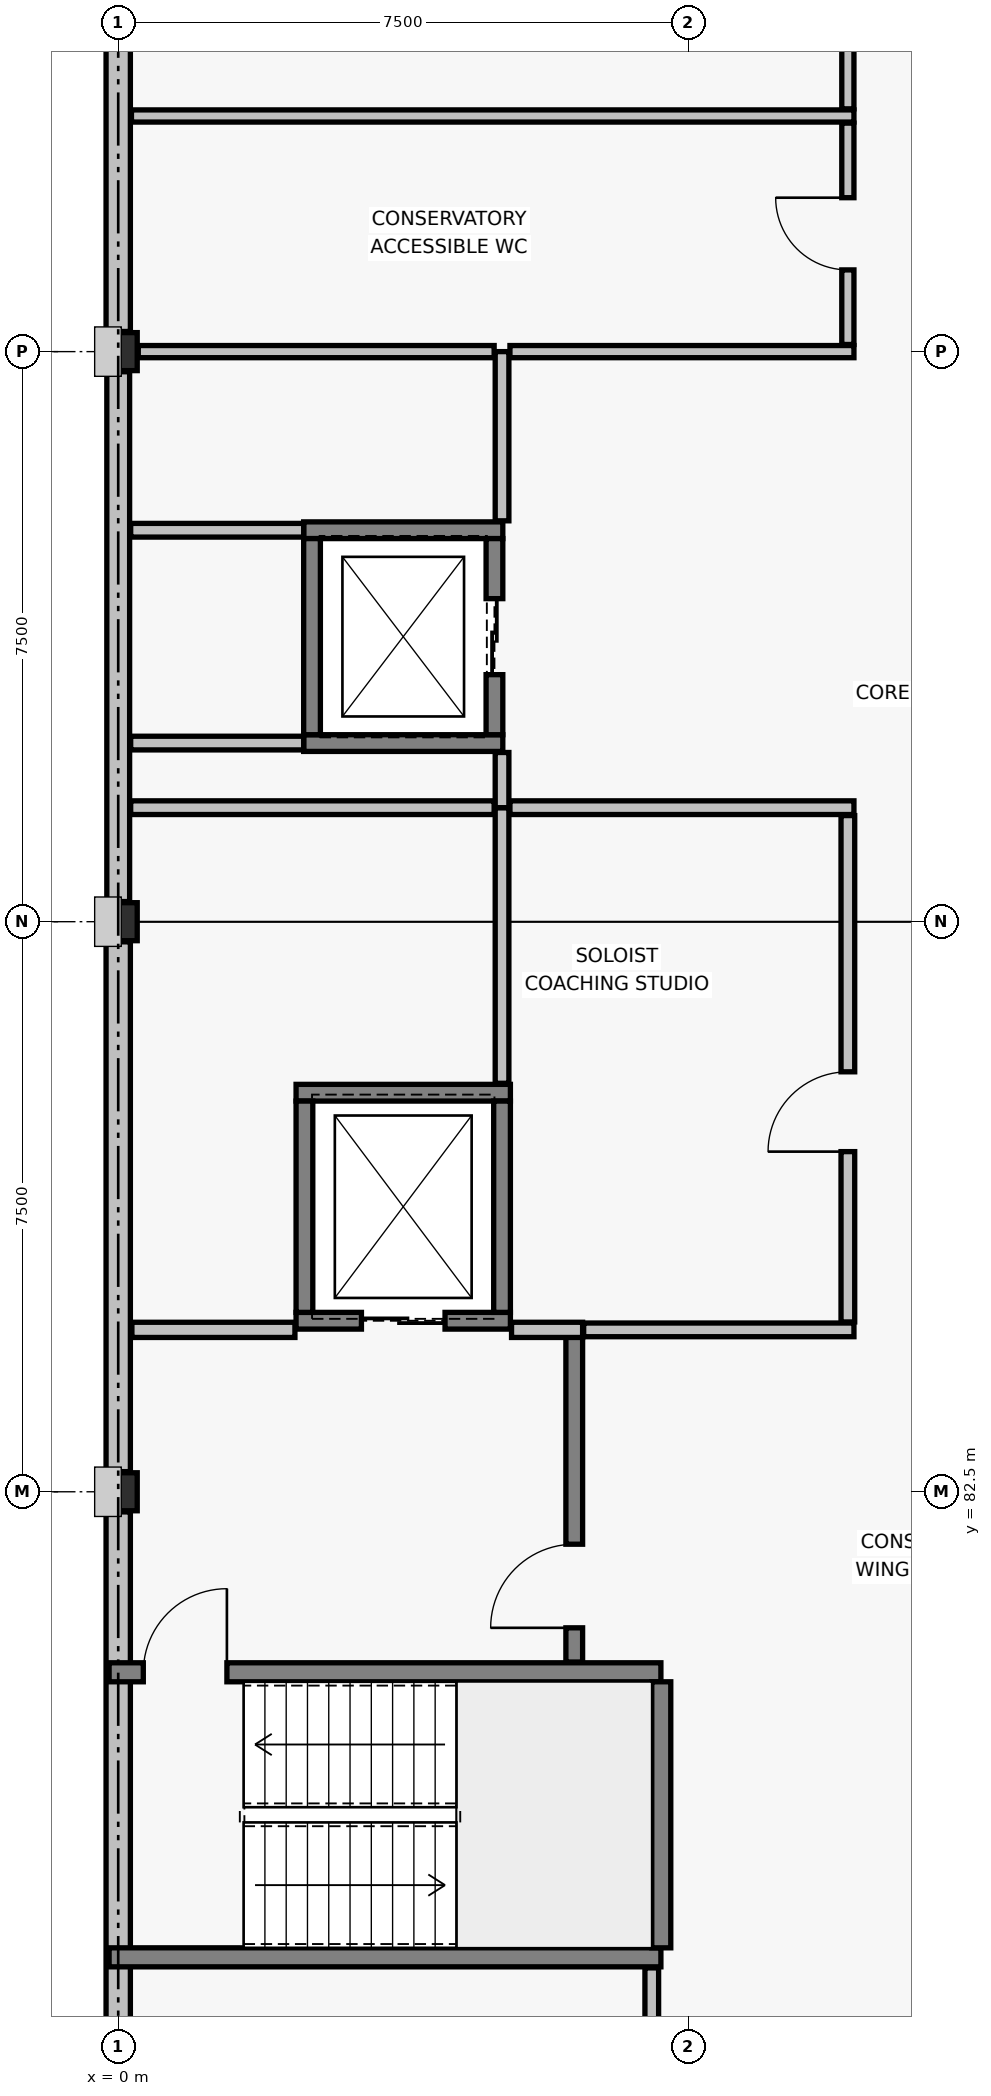
"""IFC4 building model, lengths in metres.
Left out: names, types, materials, properties, quantities, classifications, styles, units other than length and angle.
Written with IfcOpenShell. Run it as: python <this file> out.ifc"""

import sys

from ifc_helpers import new_model, si_unit, direction, frame, frame_2d, origin, origin_2d, place, context, subcontext, project, spatial, rectangle, extrude, element, fill, save


model = new_model("IFC4")
c1 = context("Model", 3, precision=1e-05, world=origin(), true_north=direction((0.0, 1.0)))
c2 = subcontext(c1, "Body", "Model", "MODEL_VIEW")
j1 = project(units=[si_unit("LENGTHUNIT", "METRE"), si_unit("PLANEANGLEUNIT", "RADIAN")], contexts=[c1])
p1 = place(None, origin())
s1 = spatial("IfcSite", under=j1, at=p1, CompositionType="ELEMENT")
p2 = place(p1, origin())
s2 = spatial("IfcBuilding", under=s1, at=p2, CompositionType="ELEMENT")
p3 = place(p2, frame((0.0, 0.0, 17.1)))
s3 = spatial("IfcBuildingStorey", under=s2, at=p3, CompositionType="ELEMENT", Elevation=17.1)
for number, where, z_axis, x_axis in (
    (1, (0.0, 82.5, 0.0), (0.0, 0.0, 1.0), (1.0, 0.0, 0.0)),
    (2, (0.0, 90.0, 0.0), (0.0, 0.0, 1.0), (1.0, 0.0, 0.0)),
    (3, (0.0, 97.5, 0.0), (0.0, 0.0, 1.0), (1.0, 0.0, 0.0)),
):
    element("IfcColumn", number, at=place(p3, frame(where, z_axis=z_axis, x_axis=x_axis)), inside=s3, PredefinedType="COLUMN", context=c2, shape_type="SweptSolid", body=[
        extrude(rectangle(XDim=0.5, YDim=0.5, at=origin_2d()), origin(), (0.0, 0.0, 1.0), 3.9),
    ])
for number, where, z_axis, x_axis in (
    (4, (0.0, 75.265, 0.0), (0.0, 0.0, 1.0), (0.0, 1.0, 0.0)),
    (5, (0.0, 82.765, 0.0), (0.0, 0.0, 1.0), (0.0, 1.0, 0.0)),
):
    element("IfcWall", number, at=place(p3, frame(where, z_axis=z_axis, x_axis=x_axis)), inside=s3, PredefinedType="SOLIDWALL", context=c2, shape_type="SweptSolid", body=[
        extrude(rectangle(XDim=6.97, YDim=0.32, at=frame_2d((3.485, 0.0))), origin(), (0.0, 0.0, 1.0), 2.59),
    ])
p4 = place(p3, frame((0.0, 90.265, 0.0), z_axis=(0.0, 0.0, 1.0), x_axis=(0.0, 1.0, 0.0)))
e6 = element("IfcWall", 6, at=p4, inside=s3, PredefinedType="SOLIDWALL", context=c2, shape_type="SweptSolid", body=[
    extrude(rectangle(XDim=6.97, YDim=0.3, at=frame_2d((3.485, 0.0))), origin(), (0.0, 0.0, 1.0), 2.59),
])
p5 = place(p3, frame((0.0, 97.765, 0.0), z_axis=(0.0, 0.0, 1.0), x_axis=(0.0, 1.0, 0.0)))
e7 = element("IfcWall", 7, at=p5, inside=s3, PredefinedType="SOLIDWALL", context=c2, shape_type="SweptSolid", body=[
    extrude(rectangle(XDim=6.97, YDim=0.32, at=frame_2d((3.485, 0.0))), origin(), (0.0, 0.0, 1.0), 2.59),
])
p6 = place(p3, frame((-0.12, 76.375, 0.0), z_axis=(0.0, 0.0, 1.0), x_axis=(1.0, 0.0, 0.0)))
e8 = element("IfcWall", 8, at=p6, inside=s3, PredefinedType="SOLIDWALL", context=c2, shape_type="SweptSolid", body=[
    extrude(rectangle(XDim=7.26, YDim=0.25, at=frame_2d((3.63, 0.0))), origin(), (0.0, 0.0, 1.0), 3.62),
])
p7 = place(p3, frame((-0.12, 80.125, 0.0), z_axis=(0.0, 0.0, 1.0), x_axis=(1.0, 0.0, 0.0)))
e9 = element("IfcWall", 9, at=p7, inside=s3, PredefinedType="SOLIDWALL", context=c2, shape_type="SweptSolid", body=[
    extrude(rectangle(XDim=7.26, YDim=0.25, at=frame_2d((3.63, 0.0))), origin(), (0.0, 0.0, 1.0), 3.62),
])
p8 = place(p7, frame((0.45, 0.0, 0.0)))
e10 = element("IfcOpeningElement", 10, at=p8, cuts=e9, PredefinedType="OPENING", context=c2, shape_type="SweptSolid", body=[
    extrude(rectangle(XDim=1.1, YDim=2.15, at=frame_2d((0.55, 1.075))), frame((0.0, 0.135, 0.0), z_axis=(0.0, -1.0, 0.0), x_axis=(1.0, 0.0, 0.0)), (0.0, 0.0, 1.0), 0.27),
])
p9 = place(p3, frame((7.145, 76.5, 0.0), z_axis=(0.0, 0.0, 1.0), x_axis=(0.0, 1.0, 0.0)))
e11 = element("IfcWall", 11, at=p9, inside=s3, PredefinedType="SOLIDWALL", context=c2, shape_type="SweptSolid", body=[
    extrude(rectangle(XDim=3.5, YDim=0.25, at=frame_2d((1.75, 0.0))), origin(), (0.0, 0.0, 1.0), 3.62),
])
for number, where, z_axis, x_axis in (
    (12, (2.44, 92.35, 0.0), (0.0, 0.0, 1.0), (1.0, 0.0, 0.0)),
    (13, (2.44, 95.15, 0.0), (0.0, 0.0, 1.0), (1.0, 0.0, 0.0)),
):
    element("IfcWall", number, at=place(p3, frame(where, z_axis=z_axis, x_axis=x_axis)), inside=s3, PredefinedType="SOLIDWALL", context=c2, shape_type="SweptSolid", body=[
        extrude(rectangle(XDim=2.62, YDim=0.22, at=frame_2d((1.31, 0.0))), origin(), (0.0, 0.0, 1.0), 3.62),
    ])
p10 = place(p3, frame((2.55, 92.46, 0.0), z_axis=(0.0, 0.0, 1.0), x_axis=(0.0, 1.0, 0.0)))
e14 = element("IfcWall", 14, at=p10, inside=s3, PredefinedType="SOLIDWALL", context=c2, shape_type="SweptSolid", body=[
    extrude(rectangle(XDim=2.58, YDim=0.22, at=frame_2d((1.29, 0.0))), origin(), (0.0, 0.0, 1.0), 3.62),
])
p11 = place(p3, frame((4.95, 92.46, 0.0), z_axis=(0.0, 0.0, 1.0), x_axis=(0.0, 1.0, 0.0)))
e15 = element("IfcWall", 15, at=p11, inside=s3, PredefinedType="SOLIDWALL", context=c2, shape_type="SweptSolid", body=[
    extrude(rectangle(XDim=2.58, YDim=0.22, at=frame_2d((1.29, 0.0))), origin(), (0.0, 0.0, 1.0), 3.62),
])
p12 = place(p11, frame((0.79, 0.0, 0.0)))
e16 = element("IfcOpeningElement", 16, at=p12, cuts=e15, PredefinedType="OPENING", context=c2, shape_type="SweptSolid", body=[
    extrude(rectangle(XDim=1.0, YDim=2.15, at=frame_2d((0.5, 1.075))), frame((0.0, 0.12, 0.0), z_axis=(0.0, -1.0, 0.0), x_axis=(1.0, 0.0, 0.0)), (0.0, 0.0, 1.0), 0.24),
])
p13 = place(p3, frame((2.34, 84.75, 0.0), z_axis=(0.0, 0.0, 1.0), x_axis=(1.0, 0.0, 0.0)))
e17 = element("IfcWall", 17, at=p13, inside=s3, PredefinedType="SOLIDWALL", context=c2, shape_type="SweptSolid", body=[
    extrude(rectangle(XDim=2.82, YDim=0.22, at=frame_2d((1.41, 0.0))), origin(), (0.0, 0.0, 1.0), 3.62),
])
p14 = place(p13, frame((0.86, 0.0, 0.0)))
e18 = element("IfcOpeningElement", 18, at=p14, cuts=e17, PredefinedType="OPENING", context=c2, shape_type="SweptSolid", body=[
    extrude(rectangle(XDim=1.1, YDim=2.15, at=frame_2d((0.55, 1.075))), frame((0.0, 0.12, 0.0), z_axis=(0.0, -1.0, 0.0), x_axis=(1.0, 0.0, 0.0)), (0.0, 0.0, 1.0), 0.24),
])
p15 = place(p3, frame((2.34, 87.75, 0.0), z_axis=(0.0, 0.0, 1.0), x_axis=(1.0, 0.0, 0.0)))
e19 = element("IfcWall", 19, at=p15, inside=s3, PredefinedType="SOLIDWALL", context=c2, shape_type="SweptSolid", body=[
    extrude(rectangle(XDim=2.82, YDim=0.22, at=frame_2d((1.41, 0.0))), origin(), (0.0, 0.0, 1.0), 3.62),
])
for number, where, z_axis, x_axis in (
    (20, (2.45, 84.86, 0.0), (0.0, 0.0, 1.0), (0.0, 1.0, 0.0)),
    (21, (5.05, 84.86, 0.0), (0.0, 0.0, 1.0), (0.0, 1.0, 0.0)),
):
    element("IfcWall", number, at=place(p3, frame(where, z_axis=z_axis, x_axis=x_axis)), inside=s3, PredefinedType="SOLIDWALL", context=c2, shape_type="SweptSolid", body=[
        extrude(rectangle(XDim=2.78, YDim=0.22, at=frame_2d((1.39, 0.0))), origin(), (0.0, 0.0, 1.0), 3.62),
    ])
p16 = place(p3, frame((6.0, 80.26, 0.0), z_axis=(0.0, 0.0, 1.0), x_axis=(0.0, 1.0, 0.0)))
e22 = element("IfcWall", 22, at=p16, inside=s3, PredefinedType="SOLIDWALL", context=c2, shape_type="SweptSolid", body=[
    extrude(rectangle(XDim=4.37, YDim=0.22, at=frame_2d((2.185, 0.0))), origin(), (0.0, 0.0, 1.0), 3.62),
])
p17 = place(p16, frame((0.45, 0.0, 0.0)))
e23 = element("IfcOpeningElement", 23, at=p17, cuts=e22, PredefinedType="OPENING", context=c2, shape_type="SweptSolid", body=[
    extrude(rectangle(XDim=1.1, YDim=2.15, at=frame_2d((0.55, 1.075))), frame((0.0, 0.12, 0.0), z_axis=(0.0, -1.0, 0.0), x_axis=(1.0, 0.0, 0.0)), (0.0, 0.0, 1.0), 0.24),
])
p18 = place(p3, frame((0.18, 84.63, 0.0), z_axis=(0.0, 0.0, 1.0), x_axis=(1.0, 0.0, 0.0)))
e24 = element("IfcWall", 24, at=p18, inside=s3, PredefinedType="PARTITIONING", context=c2, shape_type="SweptSolid", body=[
    extrude(rectangle(XDim=2.145, YDim=0.2, at=frame_2d((1.073, 0.0))), origin(), (0.0, 0.0, 1.0), 2.85),
])
p19 = place(p3, frame((5.175, 84.63, 0.0), z_axis=(0.0, 0.0, 1.0), x_axis=(1.0, 0.0, 0.0)))
e25 = element("IfcWall", 25, at=p19, inside=s3, PredefinedType="PARTITIONING", context=c2, shape_type="SweptSolid", body=[
    extrude(rectangle(XDim=0.935, YDim=0.2, at=frame_2d((0.468, 0.0))), origin(), (0.0, 0.0, 1.0), 3.2),
])
p20 = place(p3, frame((7.02, 75.0, 0.0), z_axis=(0.0, 0.0, 1.0), x_axis=(0.0, 1.0, 0.0)))
e26 = element("IfcWall", 26, at=p20, inside=s3, PredefinedType="PARTITIONING", context=c2, shape_type="SweptSolid", body=[
    extrude(rectangle(XDim=1.236, YDim=0.18, at=frame_2d((0.618, 0.0))), origin(), (0.0, 0.0, 1.0), 2.59),
])
p21 = place(p3, frame((5.05, 87.874, 0.0), z_axis=(0.0, 0.0, 1.0), x_axis=(0.0, 1.0, 0.0)))
e27 = element("IfcWall", 27, at=p21, inside=s3, PredefinedType="PARTITIONING", context=c2, shape_type="SweptSolid", body=[
    extrude(rectangle(XDim=3.626, YDim=0.18, at=frame_2d((1.813, 0.0))), origin(), (0.0, 0.0, 1.0), 2.59),
])
p22 = place(p3, frame((6.124, 84.63, 0.0), z_axis=(0.0, 0.0, 1.0), x_axis=(1.0, 0.0, 0.0)))
e28 = element("IfcWall", 28, at=p22, inside=s3, PredefinedType="PARTITIONING", context=c2, shape_type="SweptSolid", body=[
    extrude(rectangle(XDim=3.556, YDim=0.18, at=frame_2d((1.778, 0.0))), origin(), (0.0, 0.0, 1.0), 2.97),
])
p23 = place(p3, frame((0.164, 91.5, 0.0), z_axis=(0.0, 0.0, 1.0), x_axis=(1.0, 0.0, 0.0)))
e29 = element("IfcWall", 29, at=p23, inside=s3, PredefinedType="PARTITIONING", context=c2, shape_type="SweptSolid", body=[
    extrude(rectangle(XDim=4.782, YDim=0.18, at=frame_2d((2.391, 0.0))), origin(), (0.0, 0.0, 1.0), 2.84),
])
p24 = place(p3, frame((5.154, 91.5, 0.0), z_axis=(0.0, 0.0, 1.0), x_axis=(1.0, 0.0, 0.0)))
e30 = element("IfcWall", 30, at=p24, inside=s3, PredefinedType="PARTITIONING", context=c2, shape_type="SweptSolid", body=[
    extrude(rectangle(XDim=4.526, YDim=0.18, at=frame_2d((2.263, 0.0))), origin(), (0.0, 0.0, 1.0), 2.97),
])
p25 = place(p3, frame((9.6, 84.734, 0.0), z_axis=(0.0, 0.0, 1.0), x_axis=(0.0, 1.0, 0.0)))
e31 = element("IfcWall", 31, at=p25, inside=s3, PredefinedType="PARTITIONING", context=c2, shape_type="SweptSolid", body=[
    extrude(rectangle(XDim=6.662, YDim=0.18, at=frame_2d((3.331, 0.0))), origin(), (0.0, 0.0, 1.0), 2.59),
])
p26 = place(p25, frame((2.241, 0.0, 0.0)))
e32 = element("IfcOpeningElement", 32, at=p26, cuts=e31, PredefinedType="OPENING", context=c2, shape_type="SweptSolid", body=[
    extrude(rectangle(XDim=1.05, YDim=2.12, at=frame_2d((0.525, 1.06))), frame((0.0, 0.1, 0.0), z_axis=(0.0, -1.0, 0.0), x_axis=(1.0, 0.0, 0.0)), (0.0, 0.0, 1.0), 0.2),
])
for number, where, z_axis, x_axis in (
    (33, (0.164, 92.35, 0.0), (0.0, 0.0, 1.0), (1.0, 0.0, 0.0)),
    (34, (0.164, 95.15, 0.0), (0.0, 0.0, 1.0), (1.0, 0.0, 0.0)),
):
    element("IfcWall", number, at=place(p3, frame(where, z_axis=z_axis, x_axis=x_axis)), inside=s3, PredefinedType="PARTITIONING", context=c2, shape_type="SweptSolid", body=[
        extrude(rectangle(XDim=2.276, YDim=0.18, at=frame_2d((1.138, 0.0))), origin(), (0.0, 0.0, 1.0), 2.84),
    ])
p27 = place(p3, frame((5.05, 91.5, 0.0), z_axis=(0.0, 0.0, 1.0), x_axis=(0.0, 1.0, 0.0)))
e35 = element("IfcWall", 35, at=p27, inside=s3, PredefinedType="PARTITIONING", context=c2, shape_type="SweptSolid", body=[
    extrude(rectangle(XDim=0.726, YDim=0.18, at=frame_2d((0.363, 0.0))), origin(), (0.0, 0.0, 1.0), 2.97),
])
p28 = place(p3, frame((5.05, 95.274, 0.0), z_axis=(0.0, 0.0, 1.0), x_axis=(0.0, 1.0, 0.0)))
e36 = element("IfcWall", 36, at=p28, inside=s3, PredefinedType="PARTITIONING", context=c2, shape_type="SweptSolid", body=[
    extrude(rectangle(XDim=2.226, YDim=0.18, at=frame_2d((1.113, 0.0))), origin(), (0.0, 0.0, 1.0), 2.59),
])
p29 = place(p3, frame((0.264, 97.5, 0.0), z_axis=(0.0, 0.0, 1.0), x_axis=(1.0, 0.0, 0.0)))
e37 = element("IfcWall", 37, at=p29, inside=s3, PredefinedType="PARTITIONING", context=c2, shape_type="SweptSolid", body=[
    extrude(rectangle(XDim=4.682, YDim=0.16, at=frame_2d((2.341, 0.0))), origin(), (0.0, 0.0, 1.0), 2.59),
])
p30 = place(p3, frame((5.154, 97.5, 0.0), z_axis=(0.0, 0.0, 1.0), x_axis=(1.0, 0.0, 0.0)))
e38 = element("IfcWall", 38, at=p30, inside=s3, PredefinedType="PARTITIONING", context=c2, shape_type="SweptSolid", body=[
    extrude(rectangle(XDim=4.526, YDim=0.16, at=frame_2d((2.263, 0.0))), origin(), (0.0, 0.0, 1.0), 2.59),
])
p31 = place(p3, frame((0.174, 100.6, 0.0), z_axis=(0.0, 0.0, 1.0), x_axis=(1.0, 0.0, 0.0)))
e39 = element("IfcWall", 39, at=p31, inside=s3, PredefinedType="PARTITIONING", context=c2, shape_type="SweptSolid", body=[
    extrude(rectangle(XDim=9.506, YDim=0.16, at=frame_2d((4.753, 0.0))), origin(), (0.0, 0.0, 1.0), 2.97),
])
p32 = place(p3, frame((9.6, 97.594, 0.0), z_axis=(0.0, 0.0, 1.0), x_axis=(0.0, 1.0, 0.0)))
e40 = element("IfcWall", 40, at=p32, inside=s3, PredefinedType="PARTITIONING", context=c2, shape_type="SweptSolid", body=[
    extrude(rectangle(XDim=2.912, YDim=0.16, at=frame_2d((1.456, 0.0))), origin(), (0.0, 0.0, 1.0), 2.59),
])
p33 = place(p32, frame((0.981, 0.0, 0.0)))
e41 = element("IfcOpeningElement", 41, at=p33, cuts=e40, PredefinedType="OPENING", context=c2, shape_type="SweptSolid", body=[
    extrude(rectangle(XDim=0.95, YDim=2.1, at=frame_2d((0.475, 1.05))), frame((0.0, 0.09, 0.0), z_axis=(0.0, -1.0, 0.0), x_axis=(1.0, 0.0, 0.0)), (0.0, 0.0, 1.0), 0.18),
])
p34 = place(p3, frame((9.6, 100.694, 0.0), z_axis=(0.0, 0.0, 1.0), x_axis=(0.0, 1.0, 0.0)))
e42 = element("IfcWall", 42, at=p34, inside=s3, PredefinedType="PARTITIONING", context=c2, shape_type="SweptSolid", body=[
    extrude(rectangle(XDim=11.642, YDim=0.16, at=frame_2d((5.821, 0.0))), origin(), (0.0, 0.0, 1.0), 2.59),
])
p35 = place(p34, frame((5.281, 0.0, 0.0)))
e43 = element("IfcOpeningElement", 43, at=p35, cuts=e42, PredefinedType="OPENING", context=c2, shape_type="SweptSolid", body=[
    extrude(rectangle(XDim=1.05, YDim=2.12, at=frame_2d((0.525, 1.06))), frame((0.0, 0.09, 0.0), z_axis=(0.0, -1.0, 0.0), x_axis=(1.0, 0.0, 0.0)), (0.0, 0.0, 1.0), 0.18),
])
p36 = place(p8, origin())
e44 = element("IfcDoor", 44, at=p36, inside=s3, OperationType="SINGLE_SWING_RIGHT", PredefinedType="DOOR", context=c2, shape_type="SweptSolid", body=[
    extrude(rectangle(XDim=1.1, YDim=2.15, at=frame_2d((0.55, 1.075))), frame((0.0, 0.025, 0.0), z_axis=(0.0, -1.0, 0.0), x_axis=(1.0, 0.0, 0.0)), (0.0, 0.0, 1.0), 0.05),
])
fill(e10, e44)
p37 = place(p12, origin())
e45 = element("IfcDoor", 45, at=p37, inside=s3, OperationType="SLIDING_TO_LEFT", PredefinedType="DOOR", context=c2, shape_type="SweptSolid", body=[
    extrude(rectangle(XDim=1.0, YDim=2.15, at=frame_2d((0.5, 1.075))), frame((0.0, 0.025, 0.0), z_axis=(0.0, -1.0, 0.0), x_axis=(1.0, 0.0, 0.0)), (0.0, 0.0, 1.0), 0.05),
])
fill(e16, e45)
p38 = place(p14, origin())
e46 = element("IfcDoor", 46, at=p38, inside=s3, OperationType="SLIDING_TO_LEFT", PredefinedType="DOOR", context=c2, shape_type="SweptSolid", body=[
    extrude(rectangle(XDim=1.1, YDim=2.15, at=frame_2d((0.55, 1.075))), frame((0.0, 0.025, 0.0), z_axis=(0.0, -1.0, 0.0), x_axis=(1.0, 0.0, 0.0)), (0.0, 0.0, 1.0), 0.05),
])
fill(e18, e46)
p39 = place(p17, origin())
e47 = element("IfcDoor", 47, at=p39, inside=s3, OperationType="SINGLE_SWING_LEFT", PredefinedType="DOOR", context=c2, shape_type="SweptSolid", body=[
    extrude(rectangle(XDim=1.1, YDim=2.15, at=frame_2d((0.55, 1.075))), frame((0.0, 0.025, 0.0), z_axis=(0.0, -1.0, 0.0), x_axis=(1.0, 0.0, 0.0)), (0.0, 0.0, 1.0), 0.05),
])
fill(e23, e47)
p40 = place(p26, origin())
e48 = element("IfcDoor", 48, at=p40, inside=s3, OperationType="SINGLE_SWING_LEFT", PredefinedType="DOOR", context=c2, shape_type="SweptSolid", body=[
    extrude(rectangle(XDim=1.05, YDim=2.12, at=frame_2d((0.525, 1.06))), frame((0.0, 0.025, 0.0), z_axis=(0.0, -1.0, 0.0), x_axis=(1.0, 0.0, 0.0)), (0.0, 0.0, 1.0), 0.05),
])
fill(e32, e48)
p41 = place(p33, origin())
e49 = element("IfcDoor", 49, at=p41, inside=s3, OperationType="SINGLE_SWING_RIGHT", PredefinedType="DOOR", context=c2, shape_type="SweptSolid", body=[
    extrude(rectangle(XDim=0.95, YDim=2.1, at=frame_2d((0.475, 1.05))), frame((0.0, 0.025, 0.0), z_axis=(0.0, -1.0, 0.0), x_axis=(1.0, 0.0, 0.0)), (0.0, 0.0, 1.0), 0.05),
])
fill(e41, e49)
save(model, sys.argv[1])
